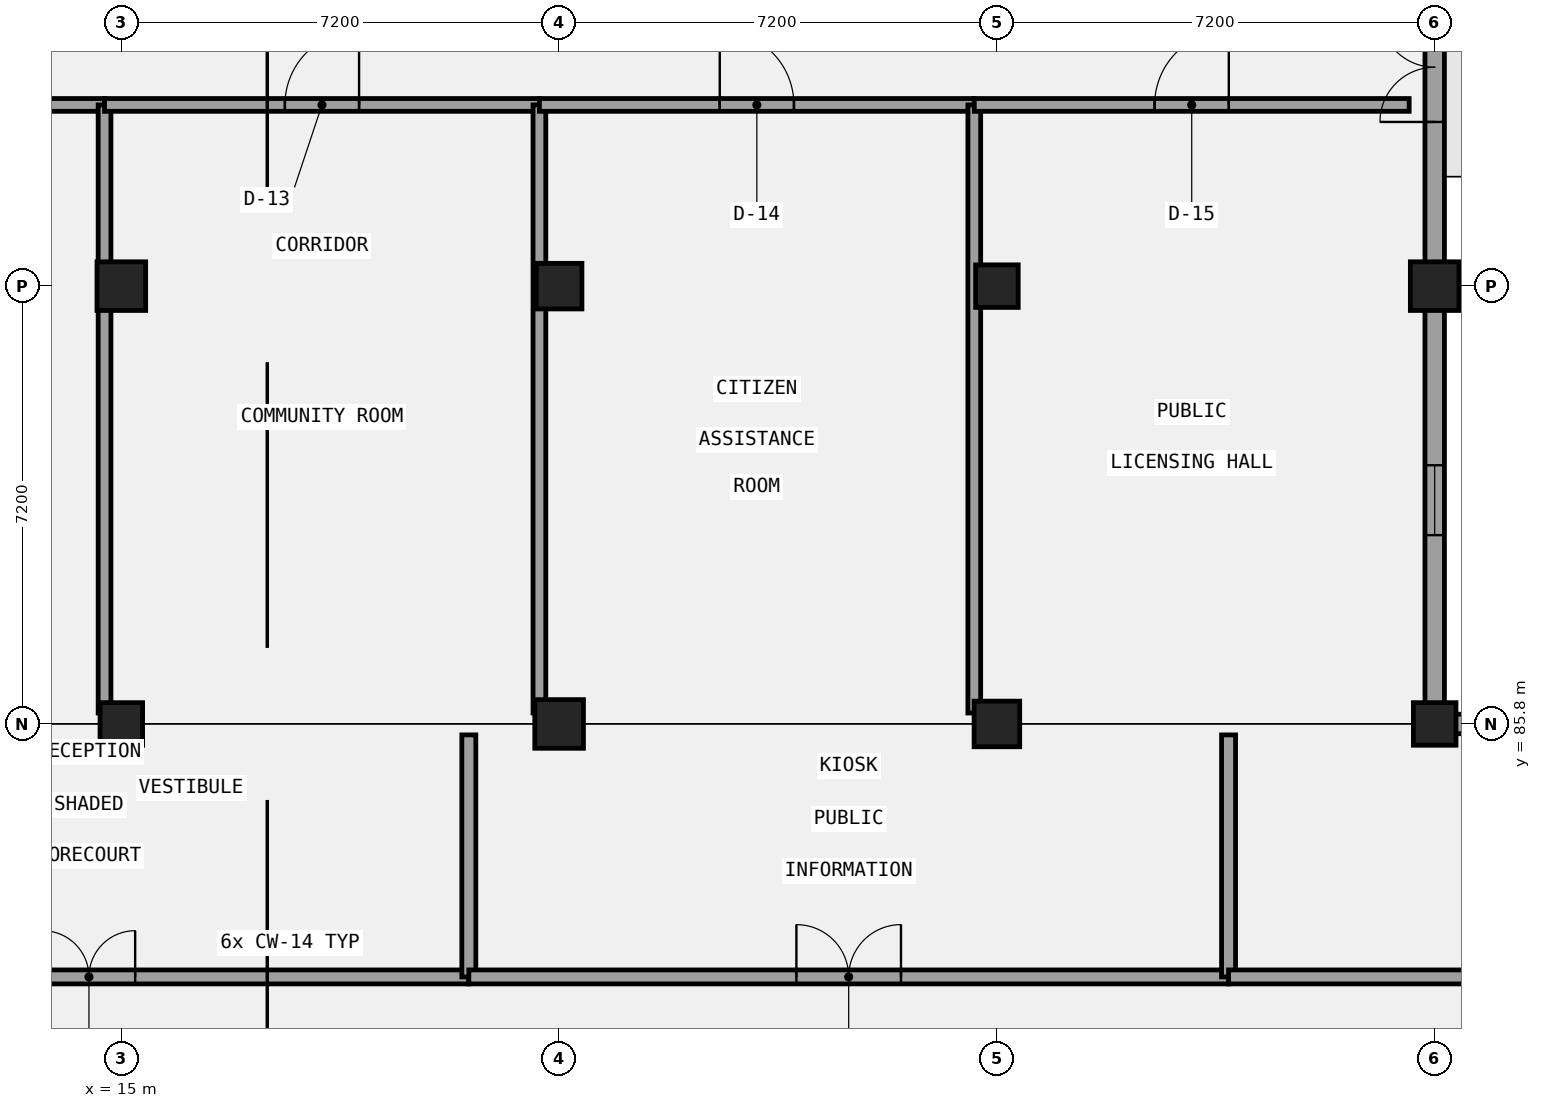
"""IFC4 building model, lengths in metres.
Left out: names, types, materials, properties, quantities, classifications, styles, units other than length and angle.
Written with IfcOpenShell. Run it as: python <this file> out.ifc"""

import sys

from ifc_helpers import new_model, si_unit, direction, frame, frame_2d, origin, origin_2d, place, context, subcontext, project, spatial, rectangle, extrude, element, fill, save


model = new_model("IFC4")
c1 = context("Model", 3, precision=1e-05, world=origin(), true_north=direction((0.0, 1.0)))
c2 = subcontext(c1, "Body", "Model", "MODEL_VIEW")
j1 = project(units=[si_unit("LENGTHUNIT", "METRE"), si_unit("PLANEANGLEUNIT", "RADIAN")], contexts=[c1])
p1 = place(None, origin())
s1 = spatial("IfcSite", under=j1, at=p1, CompositionType="ELEMENT")
p2 = place(p1, origin())
s2 = spatial("IfcBuilding", under=s1, at=p2, CompositionType="ELEMENT")
p3 = place(p2, origin())
s3 = spatial("IfcBuildingStorey", under=s2, at=p3, CompositionType="ELEMENT", Elevation=0.0)
p4 = place(p3, frame((15.0, 85.8, 0.0), z_axis=(0.0, 0.0, 1.0), x_axis=(1.0, 0.0, 0.0)))
e1 = element("IfcColumn", 1, at=p4, inside=s3, PredefinedType="COLUMN", context=c2, shape_type="SweptSolid", body=[
    extrude(rectangle(XDim=0.7, YDim=0.7, at=origin_2d()), origin(), (0.0, 0.0, 1.0), 5.4),
])
p5 = place(p3, frame((15.0, 93.0, -0.32), z_axis=(0.0, 0.0, 1.0), x_axis=(1.0, 0.0, 0.0)))
e2 = element("IfcColumn", 2, at=p5, inside=s3, PredefinedType="COLUMN", context=c2, shape_type="SweptSolid", body=[
    extrude(rectangle(XDim=0.8, YDim=0.8, at=origin_2d()), origin(), (0.0, 0.0, 1.0), 5.72),
])
p6 = place(p3, frame((22.2, 85.8, 0.0), z_axis=(0.0, 0.0, 1.0), x_axis=(1.0, 0.0, 0.0)))
e3 = element("IfcColumn", 3, at=p6, inside=s3, PredefinedType="COLUMN", context=c2, shape_type="SweptSolid", body=[
    extrude(rectangle(XDim=0.8, YDim=0.8, at=origin_2d()), origin(), (0.0, 0.0, 1.0), 5.4),
])
p7 = place(p3, frame((22.2, 93.0, -0.32), z_axis=(0.0, 0.0, 1.0), x_axis=(1.0, 0.0, 0.0)))
e4 = element("IfcColumn", 4, at=p7, inside=s3, PredefinedType="COLUMN", context=c2, shape_type="SweptSolid", body=[
    extrude(rectangle(XDim=0.75, YDim=0.75, at=origin_2d()), origin(), (0.0, 0.0, 1.0), 5.72),
])
p8 = place(p3, frame((29.4, 85.8, 0.0), z_axis=(0.0, 0.0, 1.0), x_axis=(1.0, 0.0, 0.0)))
e5 = element("IfcColumn", 5, at=p8, inside=s3, PredefinedType="COLUMN", context=c2, shape_type="SweptSolid", body=[
    extrude(rectangle(XDim=0.75, YDim=0.75, at=origin_2d()), origin(), (0.0, 0.0, 1.0), 5.4),
])
p9 = place(p3, frame((29.4, 93.0, -0.32), z_axis=(0.0, 0.0, 1.0), x_axis=(1.0, 0.0, 0.0)))
e6 = element("IfcColumn", 6, at=p9, inside=s3, PredefinedType="COLUMN", context=c2, shape_type="SweptSolid", body=[
    extrude(rectangle(XDim=0.7, YDim=0.7, at=origin_2d()), origin(), (0.0, 0.0, 1.0), 5.72),
])
p10 = place(p3, frame((36.6, 85.8, 0.0), z_axis=(0.0, 0.0, 1.0), x_axis=(1.0, 0.0, 0.0)))
e7 = element("IfcColumn", 7, at=p10, inside=s3, PredefinedType="COLUMN", context=c2, shape_type="SweptSolid", body=[
    extrude(rectangle(XDim=0.7, YDim=0.7, at=origin_2d()), origin(), (0.0, 0.0, 1.0), 5.4),
])
p11 = place(p3, frame((36.6, 93.0, -0.32), z_axis=(0.0, 0.0, 1.0), x_axis=(1.0, 0.0, 0.0)))
e8 = element("IfcColumn", 8, at=p11, inside=s3, PredefinedType="COLUMN", context=c2, shape_type="SweptSolid", body=[
    extrude(rectangle(XDim=0.8, YDim=0.8, at=origin_2d()), origin(), (0.0, 0.0, 1.0), 5.72),
])
p12 = place(p3, frame((108.76, 85.8, 0.0), z_axis=(0.0, 0.0, 1.0), x_axis=(-1.0, 0.0, 0.0)))
e9 = element("IfcWall", 9, at=p12, inside=s3, PredefinedType="SOLIDWALL", context=c2, shape_type="SweptSolid", body=[
    extrude(rectangle(XDim=72.32, YDim=0.32, at=frame_2d((36.16, 0.0))), origin(), (0.0, 0.0, 1.0), 4.12),
])
p13 = place(p12, frame((67.985, 0.0, 1.0)))
e10 = element("IfcOpeningElement", 10, at=p13, cuts=e9, PredefinedType="OPENING", context=c2, shape_type="SweptSolid", body=[
    extrude(rectangle(XDim=1.15, YDim=1.4, at=frame_2d((0.575, 0.7))), frame((0.0, 0.17, 0.0), z_axis=(0.0, -1.0, 0.0), x_axis=(1.0, 0.0, 0.0)), (0.0, 0.0, 1.0), 0.34),
])
p14 = place(p12, frame((60.785, 0.0, 1.0)))
e11 = element("IfcOpeningElement", 11, at=p14, cuts=e9, PredefinedType="OPENING", context=c2, shape_type="SweptSolid", body=[
    extrude(rectangle(XDim=1.15, YDim=1.4, at=frame_2d((0.575, 0.7))), frame((0.0, 0.17, 0.0), z_axis=(0.0, -1.0, 0.0), x_axis=(1.0, 0.0, 0.0)), (0.0, 0.0, 1.0), 0.34),
])
p15 = place(p12, frame((53.585, 0.0, 1.0)))
e12 = element("IfcOpeningElement", 12, at=p15, cuts=e9, PredefinedType="OPENING", context=c2, shape_type="SweptSolid", body=[
    extrude(rectangle(XDim=1.15, YDim=1.4, at=frame_2d((0.575, 0.7))), frame((0.0, 0.17, 0.0), z_axis=(0.0, -1.0, 0.0), x_axis=(1.0, 0.0, 0.0)), (0.0, 0.0, 1.0), 0.34),
])
p16 = place(p12, frame((46.385, 0.0, 1.0)))
e13 = element("IfcOpeningElement", 13, at=p16, cuts=e9, PredefinedType="OPENING", context=c2, shape_type="SweptSolid", body=[
    extrude(rectangle(XDim=1.15, YDim=1.4, at=frame_2d((0.575, 0.7))), frame((0.0, 0.17, 0.0), z_axis=(0.0, -1.0, 0.0), x_axis=(1.0, 0.0, 0.0)), (0.0, 0.0, 1.0), 0.34),
])
p17 = place(p12, frame((39.185, 0.0, 1.0)))
e14 = element("IfcOpeningElement", 14, at=p17, cuts=e9, PredefinedType="OPENING", context=c2, shape_type="SweptSolid", body=[
    extrude(rectangle(XDim=1.15, YDim=1.4, at=frame_2d((0.575, 0.7))), frame((0.0, 0.17, 0.0), z_axis=(0.0, -1.0, 0.0), x_axis=(1.0, 0.0, 0.0)), (0.0, 0.0, 1.0), 0.34),
])
p18 = place(p12, frame((31.985, 0.0, 1.0)))
e15 = element("IfcOpeningElement", 15, at=p18, cuts=e9, PredefinedType="OPENING", context=c2, shape_type="SweptSolid", body=[
    extrude(rectangle(XDim=1.15, YDim=1.4, at=frame_2d((0.575, 0.7))), frame((0.0, 0.17, 0.0), z_axis=(0.0, -1.0, 0.0), x_axis=(1.0, 0.0, 0.0)), (0.0, 0.0, 1.0), 0.34),
])
p19 = place(p12, frame((24.785, 0.0, 1.0)))
e16 = element("IfcOpeningElement", 16, at=p19, cuts=e9, PredefinedType="OPENING", context=c2, shape_type="SweptSolid", body=[
    extrude(rectangle(XDim=1.15, YDim=1.4, at=frame_2d((0.575, 0.7))), frame((0.0, 0.17, 0.0), z_axis=(0.0, -1.0, 0.0), x_axis=(1.0, 0.0, 0.0)), (0.0, 0.0, 1.0), 0.34),
])
p20 = place(p12, frame((17.585, 0.0, 1.0)))
e17 = element("IfcOpeningElement", 17, at=p20, cuts=e9, PredefinedType="OPENING", context=c2, shape_type="SweptSolid", body=[
    extrude(rectangle(XDim=1.15, YDim=1.4, at=frame_2d((0.575, 0.7))), frame((0.0, 0.17, 0.0), z_axis=(0.0, -1.0, 0.0), x_axis=(1.0, 0.0, 0.0)), (0.0, 0.0, 1.0), 0.34),
])
p21 = place(p12, frame((10.385, 0.0, 1.0)))
e18 = element("IfcOpeningElement", 18, at=p21, cuts=e9, PredefinedType="OPENING", context=c2, shape_type="SweptSolid", body=[
    extrude(rectangle(XDim=1.15, YDim=1.4, at=frame_2d((0.575, 0.7))), frame((0.0, 0.17, 0.0), z_axis=(0.0, -1.0, 0.0), x_axis=(1.0, 0.0, 0.0)), (0.0, 0.0, 1.0), 0.34),
])
p22 = place(p12, frame((3.185, 0.0, 1.0)))
e19 = element("IfcOpeningElement", 19, at=p22, cuts=e9, PredefinedType="OPENING", context=c2, shape_type="SweptSolid", body=[
    extrude(rectangle(XDim=1.15, YDim=1.4, at=frame_2d((0.575, 0.7))), frame((0.0, 0.17, 0.0), z_axis=(0.0, -1.0, 0.0), x_axis=(1.0, 0.0, 0.0)), (0.0, 0.0, 1.0), 0.34),
])
p23 = place(p3, frame((36.6, 85.96, 0.0), z_axis=(0.0, 0.0, 1.0), x_axis=(0.0, 1.0, 0.0)))
e20 = element("IfcWall", 20, at=p23, inside=s3, PredefinedType="SOLIDWALL", context=c2, shape_type="SweptSolid", body=[
    extrude(rectangle(XDim=21.28, YDim=0.32, at=frame_2d((10.64, 0.0))), origin(), (0.0, 0.0, 1.0), 4.27),
])
p24 = place(p23, frame((9.74, 0.0, 0.0)))
e21 = element("IfcOpeningElement", 21, at=p24, cuts=e20, PredefinedType="OPENING", context=c2, shape_type="SweptSolid", body=[
    extrude(rectangle(XDim=1.8, YDim=2.4, at=frame_2d((0.9, 1.2))), frame((0.0, 0.17, 0.0), z_axis=(0.0, -1.0, 0.0), x_axis=(1.0, 0.0, 0.0)), (0.0, 0.0, 1.0), 0.34),
])
p25 = place(p23, frame((2.945, 0.0, 1.0)))
e22 = element("IfcOpeningElement", 22, at=p25, cuts=e20, PredefinedType="OPENING", context=c2, shape_type="SweptSolid", body=[
    extrude(rectangle(XDim=1.15, YDim=1.65, at=frame_2d((0.575, 0.825))), frame((0.0, 0.17, 0.0), z_axis=(0.0, -1.0, 0.0), x_axis=(1.0, 0.0, 0.0)), (0.0, 0.0, 1.0), 0.34),
])
p26 = place(p23, frame((17.185, 0.0, 1.0)))
e23 = element("IfcOpeningElement", 23, at=p26, cuts=e20, PredefinedType="OPENING", context=c2, shape_type="SweptSolid", body=[
    extrude(rectangle(XDim=1.15, YDim=1.65, at=frame_2d((0.575, 0.825))), frame((0.0, 0.17, 0.0), z_axis=(0.0, -1.0, 0.0), x_axis=(1.0, 0.0, 0.0)), (0.0, 0.0, 1.0), 0.34),
])
p27 = place(p3, frame((7.572, 95.98, 0.0), z_axis=(0.0, 0.0, 1.0), x_axis=(1.0, 0.0, 0.0)))
e24 = element("IfcWall", 24, at=p27, inside=s3, PredefinedType="PARTITIONING", context=c2, shape_type="SweptSolid", body=[
    extrude(rectangle(XDim=7.152, YDim=0.21, at=frame_2d((3.576, 0.0))), origin(), (0.0, 0.0, 1.0), 5.12),
])
p28 = place(p27, frame((3.026, 0.0, 0.0)))
e25 = element("IfcOpeningElement", 25, at=p28, cuts=e24, PredefinedType="OPENING", context=c2, shape_type="SweptSolid", body=[
    extrude(rectangle(XDim=1.1, YDim=2.35, at=frame_2d((0.55, 1.175))), frame((0.0, 0.115, 0.0), z_axis=(0.0, -1.0, 0.0), x_axis=(1.0, 0.0, 0.0)), (0.0, 0.0, 1.0), 0.23),
])
p29 = place(p3, frame((14.724, 85.98, 0.0), z_axis=(0.0, 0.0, 1.0), x_axis=(0.0, 1.0, 0.0)))
e26 = element("IfcWall", 26, at=p29, inside=s3, PredefinedType="PARTITIONING", context=c2, shape_type="SweptSolid", body=[
    extrude(rectangle(XDim=10.0, YDim=0.21, at=frame_2d((5.0, 0.0))), origin(), (0.0, 0.0, 1.0), 4.47),
])
p30 = place(p3, frame((14.724, 95.98, 0.0), z_axis=(0.0, 0.0, 1.0), x_axis=(1.0, 0.0, 0.0)))
e27 = element("IfcWall", 27, at=p30, inside=s3, PredefinedType="PARTITIONING", context=c2, shape_type="SweptSolid", body=[
    extrude(rectangle(XDim=7.152, YDim=0.21, at=frame_2d((3.576, 0.0))), origin(), (0.0, 0.0, 1.0), 5.12),
])
p31 = place(p30, frame((2.966, 0.0, 0.0)))
e28 = element("IfcOpeningElement", 28, at=p31, cuts=e27, PredefinedType="OPENING", context=c2, shape_type="SweptSolid", body=[
    extrude(rectangle(XDim=1.22, YDim=2.1, at=frame_2d((0.61, 1.05))), frame((0.0, 0.115, 0.0), z_axis=(0.0, -1.0, 0.0), x_axis=(1.0, 0.0, 0.0)), (0.0, 0.0, 1.0), 0.23),
])
p32 = place(p3, frame((21.876, 85.98, 0.0), z_axis=(0.0, 0.0, 1.0), x_axis=(0.0, 1.0, 0.0)))
e29 = element("IfcWall", 29, at=p32, inside=s3, PredefinedType="PARTITIONING", context=c2, shape_type="SweptSolid", body=[
    extrude(rectangle(XDim=10.0, YDim=0.21, at=frame_2d((5.0, 0.0))), origin(), (0.0, 0.0, 1.0), 4.37),
])
p33 = place(p3, frame((21.876, 95.98, 0.0), z_axis=(0.0, 0.0, 1.0), x_axis=(1.0, 0.0, 0.0)))
e30 = element("IfcWall", 30, at=p33, inside=s3, PredefinedType="PARTITIONING", context=c2, shape_type="SweptSolid", body=[
    extrude(rectangle(XDim=7.152, YDim=0.21, at=frame_2d((3.576, 0.0))), origin(), (0.0, 0.0, 1.0), 5.12),
])
p34 = place(p33, frame((2.966, 0.0, 0.0)))
e31 = element("IfcOpeningElement", 31, at=p34, cuts=e30, PredefinedType="OPENING", context=c2, shape_type="SweptSolid", body=[
    extrude(rectangle(XDim=1.22, YDim=2.22, at=frame_2d((0.61, 1.11))), frame((0.0, 0.115, 0.0), z_axis=(0.0, -1.0, 0.0), x_axis=(1.0, 0.0, 0.0)), (0.0, 0.0, 1.0), 0.23),
])
p35 = place(p3, frame((29.028, 85.98, 0.0), z_axis=(0.0, 0.0, 1.0), x_axis=(0.0, 1.0, 0.0)))
e32 = element("IfcWall", 32, at=p35, inside=s3, PredefinedType="PARTITIONING", context=c2, shape_type="SweptSolid", body=[
    extrude(rectangle(XDim=10.0, YDim=0.21, at=frame_2d((5.0, 0.0))), origin(), (0.0, 0.0, 1.0), 4.42),
])
p36 = place(p3, frame((29.028, 95.98, 0.0), z_axis=(0.0, 0.0, 1.0), x_axis=(1.0, 0.0, 0.0)))
e33 = element("IfcWall", 33, at=p36, inside=s3, PredefinedType="PARTITIONING", context=c2, shape_type="SweptSolid", body=[
    extrude(rectangle(XDim=7.152, YDim=0.21, at=frame_2d((3.576, 0.0))), origin(), (0.0, 0.0, 1.0), 5.12),
])
p37 = place(p36, frame((2.966, 0.0, 0.0)))
e34 = element("IfcOpeningElement", 34, at=p37, cuts=e33, PredefinedType="OPENING", context=c2, shape_type="SweptSolid", body=[
    extrude(rectangle(XDim=1.22, YDim=2.35, at=frame_2d((0.61, 1.175))), frame((0.0, 0.115, 0.0), z_axis=(0.0, -1.0, 0.0), x_axis=(1.0, 0.0, 0.0)), (0.0, 0.0, 1.0), 0.23),
])
p38 = place(p3, frame((8.22, 81.64, 0.0), z_axis=(0.0, 0.0, 1.0), x_axis=(1.0, 0.0, 0.0)))
e35 = element("IfcWall", 35, at=p38, inside=s3, PredefinedType="PARTITIONING", context=c2, shape_type="SweptSolid", body=[
    extrude(rectangle(XDim=12.495, YDim=0.23, at=frame_2d((6.248, 0.0))), origin(), (0.0, 0.0, 1.0), 5.12),
])
p39 = place(p38, frame((5.488, 0.0, 0.0)))
e36 = element("IfcOpeningElement", 36, at=p39, cuts=e35, PredefinedType="OPENING", context=c2, shape_type="SweptSolid", body=[
    extrude(rectangle(XDim=1.52, YDim=2.35, at=frame_2d((0.76, 1.175))), frame((0.0, 0.125, 0.0), z_axis=(0.0, -1.0, 0.0), x_axis=(1.0, 0.0, 0.0)), (0.0, 0.0, 1.0), 0.25),
])
p40 = place(p3, frame((20.715, 81.64, 0.0), z_axis=(0.0, 0.0, 1.0), x_axis=(0.0, 1.0, 0.0)))
e37 = element("IfcWall", 37, at=p40, inside=s3, PredefinedType="PARTITIONING", context=c2, shape_type="SweptSolid", body=[
    extrude(rectangle(XDim=3.98, YDim=0.23, at=frame_2d((1.99, 0.0))), origin(), (0.0, 0.0, 1.0), 5.12),
])
p41 = place(p3, frame((20.715, 81.64, 0.0), z_axis=(0.0, 0.0, 1.0), x_axis=(1.0, 0.0, 0.0)))
e38 = element("IfcWall", 38, at=p41, inside=s3, PredefinedType="PARTITIONING", context=c2, shape_type="SweptSolid", body=[
    extrude(rectangle(XDim=12.495, YDim=0.23, at=frame_2d((6.248, 0.0))), origin(), (0.0, 0.0, 1.0), 5.12),
])
p42 = place(p41, frame((5.387, 0.0, 0.0)))
e39 = element("IfcOpeningElement", 39, at=p42, cuts=e38, PredefinedType="OPENING", context=c2, shape_type="SweptSolid", body=[
    extrude(rectangle(XDim=1.72, YDim=2.1, at=frame_2d((0.86, 1.05))), frame((0.0, 0.125, 0.0), z_axis=(0.0, -1.0, 0.0), x_axis=(1.0, 0.0, 0.0)), (0.0, 0.0, 1.0), 0.25),
])
p43 = place(p3, frame((33.21, 81.64, 0.0), z_axis=(0.0, 0.0, 1.0), x_axis=(0.0, 1.0, 0.0)))
e40 = element("IfcWall", 40, at=p43, inside=s3, PredefinedType="PARTITIONING", context=c2, shape_type="SweptSolid", body=[
    extrude(rectangle(XDim=3.98, YDim=0.23, at=frame_2d((1.99, 0.0))), origin(), (0.0, 0.0, 1.0), 5.12),
])
p44 = place(p3, frame((33.21, 81.64, 0.0), z_axis=(0.0, 0.0, 1.0), x_axis=(1.0, 0.0, 0.0)))
e41 = element("IfcWall", 41, at=p44, inside=s3, PredefinedType="PARTITIONING", context=c2, shape_type="SweptSolid", body=[
    extrude(rectangle(XDim=12.495, YDim=0.23, at=frame_2d((6.248, 0.0))), origin(), (0.0, 0.0, 1.0), 5.12),
])
p45 = place(p44, frame((5.387, 0.0, 0.0)))
e42 = element("IfcOpeningElement", 42, at=p45, cuts=e41, PredefinedType="OPENING", context=c2, shape_type="SweptSolid", body=[
    extrude(rectangle(XDim=1.72, YDim=2.22, at=frame_2d((0.86, 1.11))), frame((0.0, 0.125, 0.0), z_axis=(0.0, -1.0, 0.0), x_axis=(1.0, 0.0, 0.0)), (0.0, 0.0, 1.0), 0.25),
])
p46 = place(p24, frame((1.8, 0.0, 0.0), z_axis=(0.0, 0.0, 1.0), x_axis=(-1.0, 0.0, 0.0)))
e43 = element("IfcDoor", 43, at=p46, inside=s3, OperationType="DOUBLE_DOOR_SINGLE_SWING", PredefinedType="DOOR", context=c2, shape_type="SweptSolid", body=[
    extrude(rectangle(XDim=1.8, YDim=2.4, at=frame_2d((0.9, 1.2))), frame((0.0, 0.025, 0.0), z_axis=(0.0, -1.0, 0.0), x_axis=(1.0, 0.0, 0.0)), (0.0, 0.0, 1.0), 0.05),
])
fill(e21, e43)
p47 = place(p25, origin())
e44 = element("IfcWindow", 44, at=p47, inside=s3, PartitioningType="SINGLE_PANEL", PredefinedType="WINDOW", context=c2, shape_type="SweptSolid", body=[
    extrude(rectangle(XDim=1.15, YDim=1.65, at=frame_2d((0.575, 0.825))), frame((0.0, 0.03, 0.0), z_axis=(0.0, -1.0, 0.0), x_axis=(1.0, 0.0, 0.0)), (0.0, 0.0, 1.0), 0.06),
])
fill(e22, e44)
p48 = place(p31, frame((1.22, 0.0, 0.0), z_axis=(0.0, 0.0, 1.0), x_axis=(-1.0, 0.0, 0.0)))
e45 = element("IfcDoor", 45, at=p48, inside=s3, OperationType="SINGLE_SWING_RIGHT", PredefinedType="DOOR", context=c2, shape_type="SweptSolid", body=[
    extrude(rectangle(XDim=1.22, YDim=2.1, at=frame_2d((0.61, 1.05))), frame((0.0, 0.025, 0.0), z_axis=(0.0, -1.0, 0.0), x_axis=(1.0, 0.0, 0.0)), (0.0, 0.0, 1.0), 0.05),
])
fill(e28, e45)
p49 = place(p34, frame((1.22, 0.0, 0.0), z_axis=(0.0, 0.0, 1.0), x_axis=(-1.0, 0.0, 0.0)))
e46 = element("IfcDoor", 46, at=p49, inside=s3, OperationType="SINGLE_SWING_LEFT", PredefinedType="DOOR", context=c2, shape_type="SweptSolid", body=[
    extrude(rectangle(XDim=1.22, YDim=2.22, at=frame_2d((0.61, 1.11))), frame((0.0, 0.025, 0.0), z_axis=(0.0, -1.0, 0.0), x_axis=(1.0, 0.0, 0.0)), (0.0, 0.0, 1.0), 0.05),
])
fill(e31, e46)
p50 = place(p37, frame((1.22, 0.0, 0.0), z_axis=(0.0, 0.0, 1.0), x_axis=(-1.0, 0.0, 0.0)))
e47 = element("IfcDoor", 47, at=p50, inside=s3, OperationType="SINGLE_SWING_RIGHT", PredefinedType="DOOR", context=c2, shape_type="SweptSolid", body=[
    extrude(rectangle(XDim=1.22, YDim=2.35, at=frame_2d((0.61, 1.175))), frame((0.0, 0.025, 0.0), z_axis=(0.0, -1.0, 0.0), x_axis=(1.0, 0.0, 0.0)), (0.0, 0.0, 1.0), 0.05),
])
fill(e34, e47)
p51 = place(p39, origin())
e48 = element("IfcDoor", 48, at=p51, inside=s3, OperationType="DOUBLE_DOOR_SINGLE_SWING", PredefinedType="DOOR", context=c2, shape_type="SweptSolid", body=[
    extrude(rectangle(XDim=1.52, YDim=2.35, at=frame_2d((0.76, 1.175))), frame((0.0, 0.025, 0.0), z_axis=(0.0, -1.0, 0.0), x_axis=(1.0, 0.0, 0.0)), (0.0, 0.0, 1.0), 0.05),
])
fill(e36, e48)
p52 = place(p42, origin())
e49 = element("IfcDoor", 49, at=p52, inside=s3, OperationType="DOUBLE_DOOR_SINGLE_SWING", PredefinedType="DOOR", context=c2, shape_type="SweptSolid", body=[
    extrude(rectangle(XDim=1.72, YDim=2.1, at=frame_2d((0.86, 1.05))), frame((0.0, 0.025, 0.0), z_axis=(0.0, -1.0, 0.0), x_axis=(1.0, 0.0, 0.0)), (0.0, 0.0, 1.0), 0.05),
])
fill(e39, e49)
save(model, sys.argv[1])
